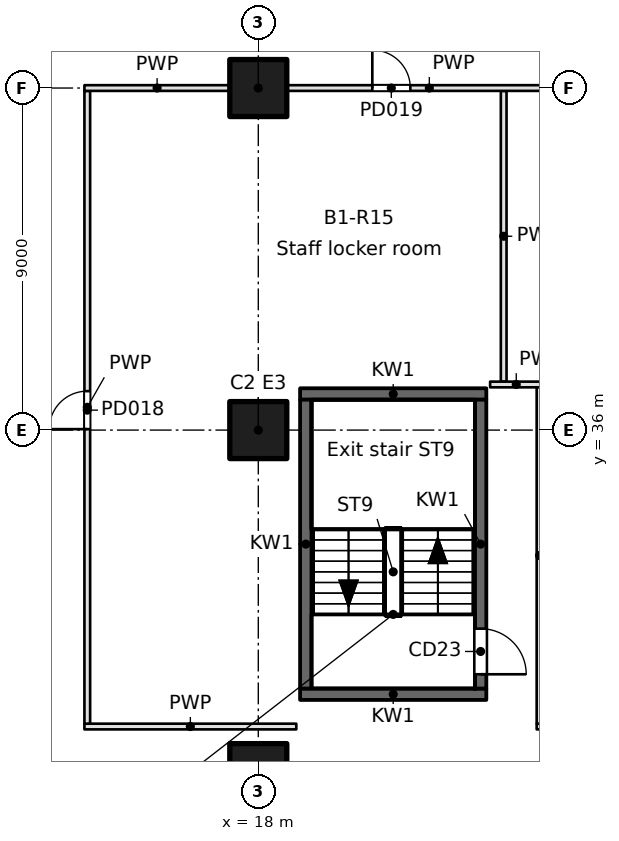
"""IFC4 building model, lengths in metres.
Left out: names, types, materials, properties, quantities, classifications, styles, units other than length and angle.
Written with IfcOpenShell. Run it as: python <this file> out.ifc"""

import sys

from ifc_helpers import new_model, si_unit, direction, frame, frame_2d, origin, origin_2d, place, context, subcontext, project, spatial, rectangle, extrude, element, fill, save


model = new_model("IFC4")
c1 = context("Model", 3, precision=1e-05, world=origin(), true_north=direction((0.0, 1.0)))
c2 = subcontext(c1, "Body", "Model", "MODEL_VIEW")
j1 = project(units=[si_unit("LENGTHUNIT", "METRE"), si_unit("PLANEANGLEUNIT", "RADIAN")], contexts=[c1])
p1 = place(None, origin())
s1 = spatial("IfcSite", under=j1, at=p1, CompositionType="ELEMENT")
p2 = place(p1, origin())
s2 = spatial("IfcBuilding", under=s1, at=p2, CompositionType="ELEMENT")
p3 = place(p2, frame((0.0, 0.0, -6.0)))
s3 = spatial("IfcBuildingStorey", under=s2, at=p3, CompositionType="ELEMENT", Elevation=-6.0)
for number, where, z_axis, x_axis in (
    (1, (18.0, 27.0, -0.6), (0.0, 0.0, 1.0), (1.0, 0.0, 0.0)),
    (2, (18.0, 36.0, -0.6), (0.0, 0.0, 1.0), (1.0, 0.0, 0.0)),
    (3, (18.0, 45.0, -0.6), (0.0, 0.0, 1.0), (1.0, 0.0, 0.0)),
):
    element("IfcColumn", number, at=place(p3, frame(where, z_axis=z_axis, x_axis=x_axis)), inside=s3, PredefinedType="COLUMN", context=c2, shape_type="SweptSolid", body=[
        extrude(rectangle(XDim=1.5, YDim=1.5, at=origin_2d()), origin(), (0.0, 0.0, 1.0), 6.6),
    ])
for number, where, z_axis, x_axis in (
    (4, (19.1, 29.05, 0.0), (0.0, 0.0, 1.0), (1.0, 0.0, 0.0)),
    (5, (19.1, 36.95, 0.0), (0.0, 0.0, 1.0), (1.0, 0.0, 0.0)),
):
    element("IfcWall", number, at=place(p3, frame(where, z_axis=z_axis, x_axis=x_axis)), inside=s3, PredefinedType="SOLIDWALL", context=c2, shape_type="SweptSolid", body=[
        extrude(rectangle(XDim=4.9, YDim=0.3, at=frame_2d((2.45, 0.0))), origin(), (0.0, 0.0, 1.0), 5.6),
    ])
p4 = place(p3, frame((19.25, 29.2, 0.0), z_axis=(0.0, 0.0, 1.0), x_axis=(0.0, 1.0, 0.0)))
e6 = element("IfcWall", 6, at=p4, inside=s3, PredefinedType="SOLIDWALL", context=c2, shape_type="SweptSolid", body=[
    extrude(rectangle(XDim=7.6, YDim=0.3, at=frame_2d((3.8, 0.0))), origin(), (0.0, 0.0, 1.0), 5.6),
])
p5 = place(p3, frame((23.85, 29.2, 0.0), z_axis=(0.0, 0.0, 1.0), x_axis=(0.0, 1.0, 0.0)))
e7 = element("IfcWall", 7, at=p5, inside=s3, PredefinedType="SOLIDWALL", context=c2, shape_type="SweptSolid", body=[
    extrude(rectangle(XDim=7.6, YDim=0.3, at=frame_2d((3.8, 0.0))), origin(), (0.0, 0.0, 1.0), 5.6),
])
p6 = place(p5, frame((0.375, 0.0, 0.0)))
e8 = element("IfcOpeningElement", 8, at=p6, cuts=e7, PredefinedType="OPENING", context=c2, shape_type="SweptSolid", body=[
    extrude(rectangle(XDim=1.2, YDim=2.1, at=frame_2d((0.6, 1.05))), frame((0.0, 0.15, 0.0), z_axis=(0.0, -1.0, 0.0), x_axis=(1.0, 0.0, 0.0)), (0.0, 0.0, 1.0), 0.3),
])
p7 = place(p3, frame((24.457, 37.275, 0.0), z_axis=(0.0, 0.0, 1.0), x_axis=(0.0, 1.0, 0.0)))
e9 = element("IfcWall", 9, at=p7, inside=s3, PredefinedType="PARTITIONING", context=c2, shape_type="SweptSolid", body=[
    extrude(rectangle(XDim=7.65, YDim=0.15, at=frame_2d((3.825, 0.0))), origin(), (0.0, 0.0, 1.0), 5.6),
])
p8 = place(p3, frame((25.475, 37.2, 0.0), z_axis=(0.0, 0.0, 1.0), x_axis=(-1.0, 0.0, 0.0)))
e10 = element("IfcWall", 10, at=p8, inside=s3, PredefinedType="PARTITIONING", context=c2, shape_type="SweptSolid", body=[
    extrude(rectangle(XDim=1.375, YDim=0.15, at=frame_2d((0.688, 0.0))), origin(), (0.0, 0.0, 1.0), 5.6),
])
p9 = place(p3, frame((19.0, 28.2, 0.0), z_axis=(0.0, 0.0, 1.0), x_axis=(-1.0, 0.0, 0.0)))
e11 = element("IfcWall", 11, at=p9, inside=s3, PredefinedType="PARTITIONING", context=c2, shape_type="SweptSolid", body=[
    extrude(rectangle(XDim=5.575, YDim=0.15, at=frame_2d((2.788, 0.0))), origin(), (0.0, 0.0, 1.0), 5.6),
])
p10 = place(p3, frame((44.1, 28.2, 0.0), z_axis=(0.0, 0.0, 1.0), x_axis=(-1.0, 0.0, 0.0)))
e12 = element("IfcWall", 12, at=p10, inside=s3, PredefinedType="PARTITIONING", context=c2, shape_type="SweptSolid", body=[
    extrude(rectangle(XDim=18.775, YDim=0.15, at=frame_2d((9.388, 0.0))), origin(), (0.0, 0.0, 1.0), 5.6),
])
p11 = place(p10, frame((15.2, 0.0, 0.0)))
e13 = element("IfcOpeningElement", 13, at=p11, cuts=e12, PredefinedType="OPENING", context=c2, shape_type="SweptSolid", body=[
    extrude(rectangle(XDim=1.0, YDim=2.1, at=frame_2d((0.5, 1.05))), frame((0.0, 0.075, 0.0), z_axis=(0.0, -1.0, 0.0), x_axis=(1.0, 0.0, 0.0)), (0.0, 0.0, 1.0), 0.15),
])
p12 = place(p10, frame((9.096, 0.0, 0.0)))
e14 = element("IfcOpeningElement", 14, at=p12, cuts=e12, PredefinedType="OPENING", context=c2, shape_type="SweptSolid", body=[
    extrude(rectangle(XDim=1.2, YDim=2.1, at=frame_2d((0.6, 1.05))), frame((0.0, 0.075, 0.0), z_axis=(0.0, -1.0, 0.0), x_axis=(1.0, 0.0, 0.0)), (0.0, 0.0, 1.0), 0.15),
])
p13 = place(p10, frame((2.498, 0.0, 0.0)))
e15 = element("IfcOpeningElement", 15, at=p13, cuts=e12, PredefinedType="OPENING", context=c2, shape_type="SweptSolid", body=[
    extrude(rectangle(XDim=1.2, YDim=2.1, at=frame_2d((0.6, 1.05))), frame((0.0, 0.075, 0.0), z_axis=(0.0, -1.0, 0.0), x_axis=(1.0, 0.0, 0.0)), (0.0, 0.0, 1.0), 0.15),
])
p14 = place(p3, frame((13.5, 28.275, 0.0), z_axis=(0.0, 0.0, 1.0), x_axis=(0.0, 1.0, 0.0)))
e16 = element("IfcWall", 16, at=p14, inside=s3, PredefinedType="PARTITIONING", context=c2, shape_type="SweptSolid", body=[
    extrude(rectangle(XDim=16.65, YDim=0.15, at=frame_2d((8.325, 0.0))), origin(), (0.0, 0.0, 1.0), 5.6),
])
p15 = place(p14, frame((7.75, 0.0, 0.0)))
e17 = element("IfcOpeningElement", 17, at=p15, cuts=e16, PredefinedType="OPENING", context=c2, shape_type="SweptSolid", body=[
    extrude(rectangle(XDim=1.0, YDim=2.1, at=frame_2d((0.5, 1.05))), frame((0.0, 0.075, 0.0), z_axis=(0.0, -1.0, 0.0), x_axis=(1.0, 0.0, 0.0)), (0.0, 0.0, 1.0), 0.15),
])
p16 = place(p3, frame((13.425, 45.0, 0.0), z_axis=(0.0, 0.0, 1.0), x_axis=(1.0, 0.0, 0.0)))
e18 = element("IfcWall", 18, at=p16, inside=s3, PredefinedType="PARTITIONING", context=c2, shape_type="SweptSolid", body=[
    extrude(rectangle(XDim=3.825, YDim=0.15, at=frame_2d((1.913, 0.0))), origin(), (0.0, 0.0, 1.0), 5.6),
])
p17 = place(p3, frame((18.75, 45.0, 0.0), z_axis=(0.0, 0.0, 1.0), x_axis=(1.0, 0.0, 0.0)))
e19 = element("IfcWall", 19, at=p17, inside=s3, PredefinedType="PARTITIONING", context=c2, shape_type="SweptSolid", body=[
    extrude(rectangle(XDim=7.5, YDim=0.15, at=frame_2d((3.75, 0.0))), origin(), (0.0, 0.0, 1.0), 5.6),
])
p18 = place(p17, frame((2.25, 0.0, 0.0)))
e20 = element("IfcOpeningElement", 20, at=p18, cuts=e19, PredefinedType="OPENING", context=c2, shape_type="SweptSolid", body=[
    extrude(rectangle(XDim=1.0, YDim=2.1, at=frame_2d((0.5, 1.05))), frame((0.0, 0.075, 0.0), z_axis=(0.0, -1.0, 0.0), x_axis=(1.0, 0.0, 0.0)), (0.0, 0.0, 1.0), 0.15),
])
p19 = place(p3, frame((25.4, 28.275, 0.0), z_axis=(0.0, 0.0, 1.0), x_axis=(0.0, 1.0, 0.0)))
e21 = element("IfcWall", 21, at=p19, inside=s3, PredefinedType="PARTITIONING", context=c2, shape_type="SweptSolid", body=[
    extrude(rectangle(XDim=8.85, YDim=0.15, at=frame_2d((4.425, 0.0))), origin(), (0.0, 0.0, 1.0), 5.6),
])
p20 = place(p6, frame((1.2, 0.0, 0.0), z_axis=(0.0, 0.0, 1.0), x_axis=(-1.0, 0.0, 0.0)))
e22 = element("IfcDoor", 22, at=p20, inside=s3, OperationType="SINGLE_SWING_RIGHT", PredefinedType="DOOR", context=c2, shape_type="SweptSolid", body=[
    extrude(rectangle(XDim=1.2, YDim=2.1, at=frame_2d((0.6, 1.05))), frame((0.0, 0.025, 0.0), z_axis=(0.0, -1.0, 0.0), x_axis=(1.0, 0.0, 0.0)), (0.0, 0.0, 1.0), 0.05),
])
fill(e8, e22)
p21 = place(p15, origin())
e23 = element("IfcDoor", 23, at=p21, inside=s3, OperationType="SINGLE_SWING_LEFT", PredefinedType="DOOR", context=c2, shape_type="SweptSolid", body=[
    extrude(rectangle(XDim=1.0, YDim=2.1, at=frame_2d((0.5, 1.05))), frame((0.0, 0.025, 0.0), z_axis=(0.0, -1.0, 0.0), x_axis=(1.0, 0.0, 0.0)), (0.0, 0.0, 1.0), 0.05),
])
fill(e17, e23)
p22 = place(p18, origin())
e24 = element("IfcDoor", 24, at=p22, inside=s3, OperationType="SINGLE_SWING_LEFT", PredefinedType="DOOR", context=c2, shape_type="SweptSolid", body=[
    extrude(rectangle(XDim=1.0, YDim=2.1, at=frame_2d((0.5, 1.05))), frame((0.0, 0.025, 0.0), z_axis=(0.0, -1.0, 0.0), x_axis=(1.0, 0.0, 0.0)), (0.0, 0.0, 1.0), 0.05),
])
fill(e20, e24)
save(model, sys.argv[1])
